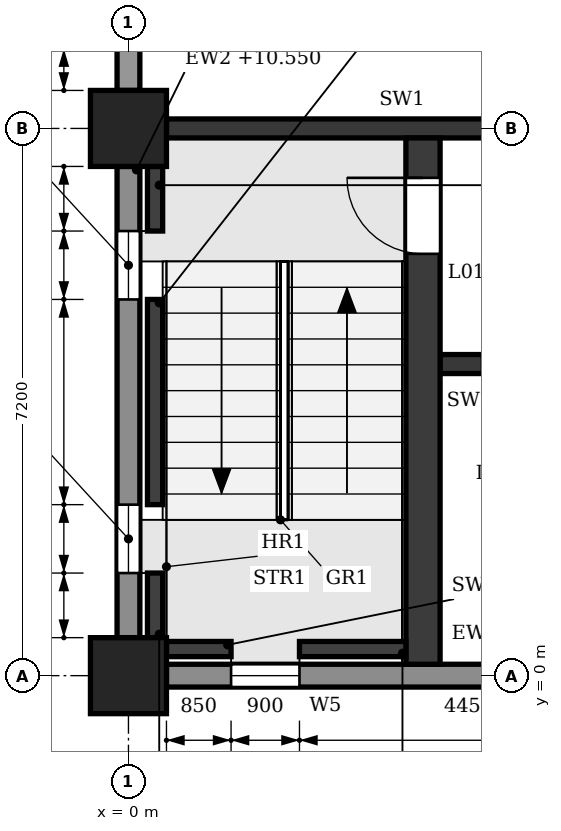
"""IFC4 building model, lengths in metres.
Left out: names, types, materials, properties, quantities, classifications, styles, units other than length and angle.
Written with IfcOpenShell. Run it as: python <this file> out.ifc"""

import sys

from ifc_helpers import new_model, si_unit, direction, frame, frame_2d, origin, origin_2d, place, context, subcontext, project, spatial, polyline, rectangle, outline, extrude, element, fill, save


model = new_model("IFC4")
c1 = context("Model", 3, precision=1e-05, world=origin(), true_north=direction((0.0, 1.0)))
c2 = subcontext(c1, "Body", "Model", "MODEL_VIEW")
j1 = project(units=[si_unit("LENGTHUNIT", "METRE"), si_unit("PLANEANGLEUNIT", "RADIAN")], contexts=[c1])
p1 = place(None, origin())
s1 = spatial("IfcSite", under=j1, at=p1, CompositionType="ELEMENT")
p2 = place(p1, origin())
s2 = spatial("IfcBuilding", under=s1, at=p2, CompositionType="ELEMENT")
p3 = place(p2, frame((0.0, 0.0, 6.0)))
s3 = spatial("IfcBuildingStorey", under=s2, at=p3, CompositionType="ELEMENT", Elevation=6.0)
for number, where, z_axis, x_axis in (
    (1, (0.0, 0.0, 0.0), (0.0, 0.0, 1.0), (1.0, 0.0, 0.0)),
    (2, (0.0, 7.2, 0.0), (0.0, 0.0, 1.0), (1.0, 0.0, 0.0)),
):
    element("IfcColumn", number, at=place(p3, frame(where, z_axis=z_axis, x_axis=x_axis)), inside=s3, PredefinedType="COLUMN", context=c2, shape_type="SweptSolid", body=[
        extrude(rectangle(XDim=1.0, YDim=1.0, at=origin_2d()), origin(), (0.0, 0.0, 1.0), 5.4),
    ])
p4 = place(p3, frame((0.0, 0.5, 0.0), z_axis=(0.0, 0.0, 1.0), x_axis=(0.0, 1.0, 0.0)))
e3 = element("IfcWall", 3, at=p4, inside=s3, PredefinedType="STANDARD", context=c2, shape_type="SweptSolid", body=[
    extrude(rectangle(XDim=6.2, YDim=0.3, at=frame_2d((3.1, 0.0))), origin(), (0.0, 0.0, 1.0), 4.55),
])
p5 = place(p4, frame((0.85, 0.0, 0.9)))
e4 = element("IfcOpeningElement", 4, at=p5, cuts=e3, PredefinedType="OPENING", context=c2, shape_type="SweptSolid", body=[
    extrude(outline(polyline([(0.0, 0.0), (0.9, 0.0), (0.9, 3.15), (0.45, 3.6), (0.0, 3.15), (0.0, 0.0)])), frame((0.0, 0.16, 0.0), z_axis=(0.0, -1.0, 0.0), x_axis=(1.0, 0.0, 0.0)), (0.0, 0.0, 1.0), 0.32),
])
p6 = place(p4, frame((4.45, 0.0, 0.9)))
e5 = element("IfcOpeningElement", 5, at=p6, cuts=e3, PredefinedType="OPENING", context=c2, shape_type="SweptSolid", body=[
    extrude(outline(polyline([(0.0, 0.0), (0.9, 0.0), (0.9, 3.15), (0.45, 3.6), (0.0, 3.15), (0.0, 0.0)])), frame((0.0, 0.16, 0.0), z_axis=(0.0, -1.0, 0.0), x_axis=(1.0, 0.0, 0.0)), (0.0, 0.0, 1.0), 0.32),
])
p7 = place(p3, frame((0.0, 7.7, 0.0), z_axis=(0.0, 0.0, 1.0), x_axis=(0.0, 1.0, 0.0)))
e6 = element("IfcWall", 6, at=p7, inside=s3, PredefinedType="STANDARD", context=c2, shape_type="SweptSolid", body=[
    extrude(rectangle(XDim=6.2, YDim=0.3, at=frame_2d((3.1, 0.0))), origin(), (0.0, 0.0, 1.0), 4.55),
])
p8 = place(p7, frame((0.55, 0.0, 0.9)))
e7 = element("IfcOpeningElement", 7, at=p8, cuts=e6, PredefinedType="OPENING", context=c2, shape_type="SweptSolid", body=[
    extrude(outline(polyline([(0.0, 0.0), (1.5, 0.0), (1.5, 2.85), (0.75, 3.6), (0.0, 2.85), (0.0, 0.0)])), frame((0.0, 0.16, 0.0), z_axis=(0.0, -1.0, 0.0), x_axis=(1.0, 0.0, 0.0)), (0.0, 0.0, 1.0), 0.32),
])
p9 = place(p7, frame((4.15, 0.0, 0.9)))
e8 = element("IfcOpeningElement", 8, at=p9, cuts=e6, PredefinedType="OPENING", context=c2, shape_type="SweptSolid", body=[
    extrude(outline(polyline([(0.0, 0.0), (1.5, 0.0), (1.5, 2.85), (0.75, 3.6), (0.0, 2.85), (0.0, 0.0)])), frame((0.0, 0.16, 0.0), z_axis=(0.0, -1.0, 0.0), x_axis=(1.0, 0.0, 0.0)), (0.0, 0.0, 1.0), 0.32),
])
p10 = place(p3, frame((0.5, 0.0, 0.0), z_axis=(0.0, 0.0, 1.0), x_axis=(1.0, 0.0, 0.0)))
e9 = element("IfcWall", 9, at=p10, inside=s3, PredefinedType="STANDARD", context=c2, shape_type="SweptSolid", body=[
    extrude(rectangle(XDim=6.2, YDim=0.3, at=frame_2d((3.1, 0.0))), origin(), (0.0, 0.0, 1.0), 4.55),
])
p11 = place(p10, frame((0.85, 0.0, 0.9)))
e10 = element("IfcOpeningElement", 10, at=p11, cuts=e9, PredefinedType="OPENING", context=c2, shape_type="SweptSolid", body=[
    extrude(outline(polyline([(0.0, 0.0), (0.9, 0.0), (0.9, 3.15), (0.45, 3.6), (0.0, 3.15), (0.0, 0.0)])), frame((0.0, 0.16, 0.0), z_axis=(0.0, -1.0, 0.0), x_axis=(1.0, 0.0, 0.0)), (0.0, 0.0, 1.0), 0.32),
])
p12 = place(p3, frame((0.5, 7.2, 0.0), z_axis=(0.0, 0.0, 1.0), x_axis=(1.0, 0.0, 0.0)))
e11 = element("IfcWall", 11, at=p12, inside=s3, PredefinedType="SHEAR", context=c2, shape_type="SweptSolid", body=[
    extrude(rectangle(XDim=6.2, YDim=0.25, at=frame_2d((3.1, 0.0))), origin(), (0.0, 0.0, 1.0), 4.4),
])
p13 = place(p12, frame((4.75, 0.0, 0.0)))
e12 = element("IfcOpeningElement", 12, at=p13, cuts=e11, PredefinedType="OPENING", context=c2, shape_type="SweptSolid", body=[
    extrude(rectangle(XDim=1.1, YDim=2.1, at=frame_2d((0.55, 1.05))), frame((0.0, 0.135, 0.0), z_axis=(0.0, -1.0, 0.0), x_axis=(1.0, 0.0, 0.0)), (0.0, 0.0, 1.0), 0.27),
])
p14 = place(p3, frame((0.35, 0.5, -0.25), z_axis=(0.0, 0.0, 1.0), x_axis=(0.0, 1.0, 0.0)))
e13 = element("IfcWall", 13, at=p14, inside=s3, PredefinedType="SHEAR", context=c2, shape_type="SweptSolid", body=[
    extrude(rectangle(XDim=0.85, YDim=0.2, at=frame_2d((0.425, 0.0))), origin(), (0.0, 0.0, 1.0), 5.4),
])
p15 = place(p3, frame((0.35, 2.25, -0.25), z_axis=(0.0, 0.0, 1.0), x_axis=(0.0, 1.0, 0.0)))
e14 = element("IfcWall", 14, at=p15, inside=s3, PredefinedType="SHEAR", context=c2, shape_type="SweptSolid", body=[
    extrude(rectangle(XDim=2.7, YDim=0.2, at=frame_2d((1.35, 0.0))), origin(), (0.0, 0.0, 1.0), 5.4),
])
p16 = place(p3, frame((0.35, 5.85, -0.25), z_axis=(0.0, 0.0, 1.0), x_axis=(0.0, 1.0, 0.0)))
e15 = element("IfcWall", 15, at=p16, inside=s3, PredefinedType="SHEAR", context=c2, shape_type="SweptSolid", body=[
    extrude(rectangle(XDim=0.85, YDim=0.2, at=frame_2d((0.425, 0.0))), origin(), (0.0, 0.0, 1.0), 5.4),
])
p17 = place(p3, frame((0.5, 0.35, -0.25), z_axis=(0.0, 0.0, 1.0), x_axis=(1.0, 0.0, 0.0)))
e16 = element("IfcWall", 16, at=p17, inside=s3, PredefinedType="SHEAR", context=c2, shape_type="SweptSolid", body=[
    extrude(rectangle(XDim=0.85, YDim=0.2, at=frame_2d((0.425, 0.0))), origin(), (0.0, 0.0, 1.0), 5.4),
])
p18 = place(p3, frame((2.25, 0.35, -0.25), z_axis=(0.0, 0.0, 1.0), x_axis=(1.0, 0.0, 0.0)))
e17 = element("IfcWall", 17, at=p18, inside=s3, PredefinedType="SHEAR", context=c2, shape_type="SweptSolid", body=[
    extrude(rectangle(XDim=1.4, YDim=0.2, at=frame_2d((0.7, 0.0))), origin(), (0.0, 0.0, 1.0), 5.4),
])
p19 = place(p3, frame((3.875, 0.15, 0.0), z_axis=(0.0, 0.0, 1.0), x_axis=(0.0, 1.0, 0.0)))
e18 = element("IfcWall", 18, at=p19, inside=s3, PredefinedType="SHEAR", context=c2, shape_type="SweptSolid", body=[
    extrude(rectangle(XDim=6.925, YDim=0.45, at=frame_2d((3.462, 0.0))), origin(), (0.0, 0.0, 1.0), 5.15),
])
p20 = place(p19, frame((5.4, 0.0, 0.0)))
e19 = element("IfcOpeningElement", 19, at=p20, cuts=e18, PredefinedType="OPENING", context=c2, shape_type="SweptSolid", body=[
    extrude(rectangle(XDim=1.0, YDim=2.1, at=frame_2d((0.5, 1.05))), frame((0.0, 0.235, 0.0), z_axis=(0.0, -1.0, 0.0), x_axis=(1.0, 0.0, 0.0)), (0.0, 0.0, 1.0), 0.47),
])
p21 = place(p3, frame((4.1, 4.1, 0.0), z_axis=(0.0, 0.0, 1.0), x_axis=(1.0, 0.0, 0.0)))
e20 = element("IfcWall", 20, at=p21, inside=s3, PredefinedType="SHEAR", context=c2, shape_type="SweptSolid", body=[
    extrude(rectangle(XDim=2.975, YDim=0.25, at=frame_2d((1.487, 0.0))), origin(), (0.0, 0.0, 1.0), 5.15),
])
p22 = place(p21, frame((0.55, 0.0, 0.0)))
e21 = element("IfcOpeningElement", 21, at=p22, cuts=e20, PredefinedType="OPENING", context=c2, shape_type="SweptSolid", body=[
    extrude(rectangle(XDim=0.9, YDim=2.1, at=frame_2d((0.45, 1.05))), frame((0.0, 0.135, 0.0), z_axis=(0.0, -1.0, 0.0), x_axis=(1.0, 0.0, 0.0)), (0.0, 0.0, 1.0), 0.27),
])
p23 = place(p11, origin())
e22 = element("IfcWindow", 22, at=p23, inside=s3, PartitioningType="SINGLE_PANEL", PredefinedType="WINDOW", context=c2, shape_type="SweptSolid", body=[
    extrude(outline(polyline([(0.0, 0.0), (0.9, 0.0), (0.9, 3.15), (0.45, 3.6), (0.0, 3.15), (0.0, 0.0)])), frame((0.0, 0.03, 0.0), z_axis=(0.0, -1.0, 0.0), x_axis=(1.0, 0.0, 0.0)), (0.0, 0.0, 1.0), 0.06),
])
fill(e10, e22)
p24 = place(p5, origin())
e23 = element("IfcWindow", 23, at=p24, inside=s3, PartitioningType="SINGLE_PANEL", PredefinedType="WINDOW", context=c2, shape_type="SweptSolid", body=[
    extrude(outline(polyline([(0.0, 0.0), (0.9, 0.0), (0.9, 3.15), (0.45, 3.6), (0.0, 3.15), (0.0, 0.0)])), frame((0.0, 0.03, 0.0), z_axis=(0.0, -1.0, 0.0), x_axis=(1.0, 0.0, 0.0)), (0.0, 0.0, 1.0), 0.06),
])
fill(e4, e23)
p25 = place(p6, origin())
e24 = element("IfcWindow", 24, at=p25, inside=s3, PartitioningType="SINGLE_PANEL", PredefinedType="WINDOW", context=c2, shape_type="SweptSolid", body=[
    extrude(outline(polyline([(0.0, 0.0), (0.9, 0.0), (0.9, 3.15), (0.45, 3.6), (0.0, 3.15), (0.0, 0.0)])), frame((0.0, 0.03, 0.0), z_axis=(0.0, -1.0, 0.0), x_axis=(1.0, 0.0, 0.0)), (0.0, 0.0, 1.0), 0.06),
])
fill(e5, e24)
p26 = place(p20, origin())
e25 = element("IfcDoor", 25, at=p26, inside=s3, OperationType="SINGLE_SWING_RIGHT", PredefinedType="DOOR", context=c2, shape_type="SweptSolid", body=[
    extrude(rectangle(XDim=1.0, YDim=2.1, at=frame_2d((0.5, 1.05))), frame((0.0, 0.025, 0.0), z_axis=(0.0, -1.0, 0.0), x_axis=(1.0, 0.0, 0.0)), (0.0, 0.0, 1.0), 0.05),
])
fill(e19, e25)
save(model, sys.argv[1])
